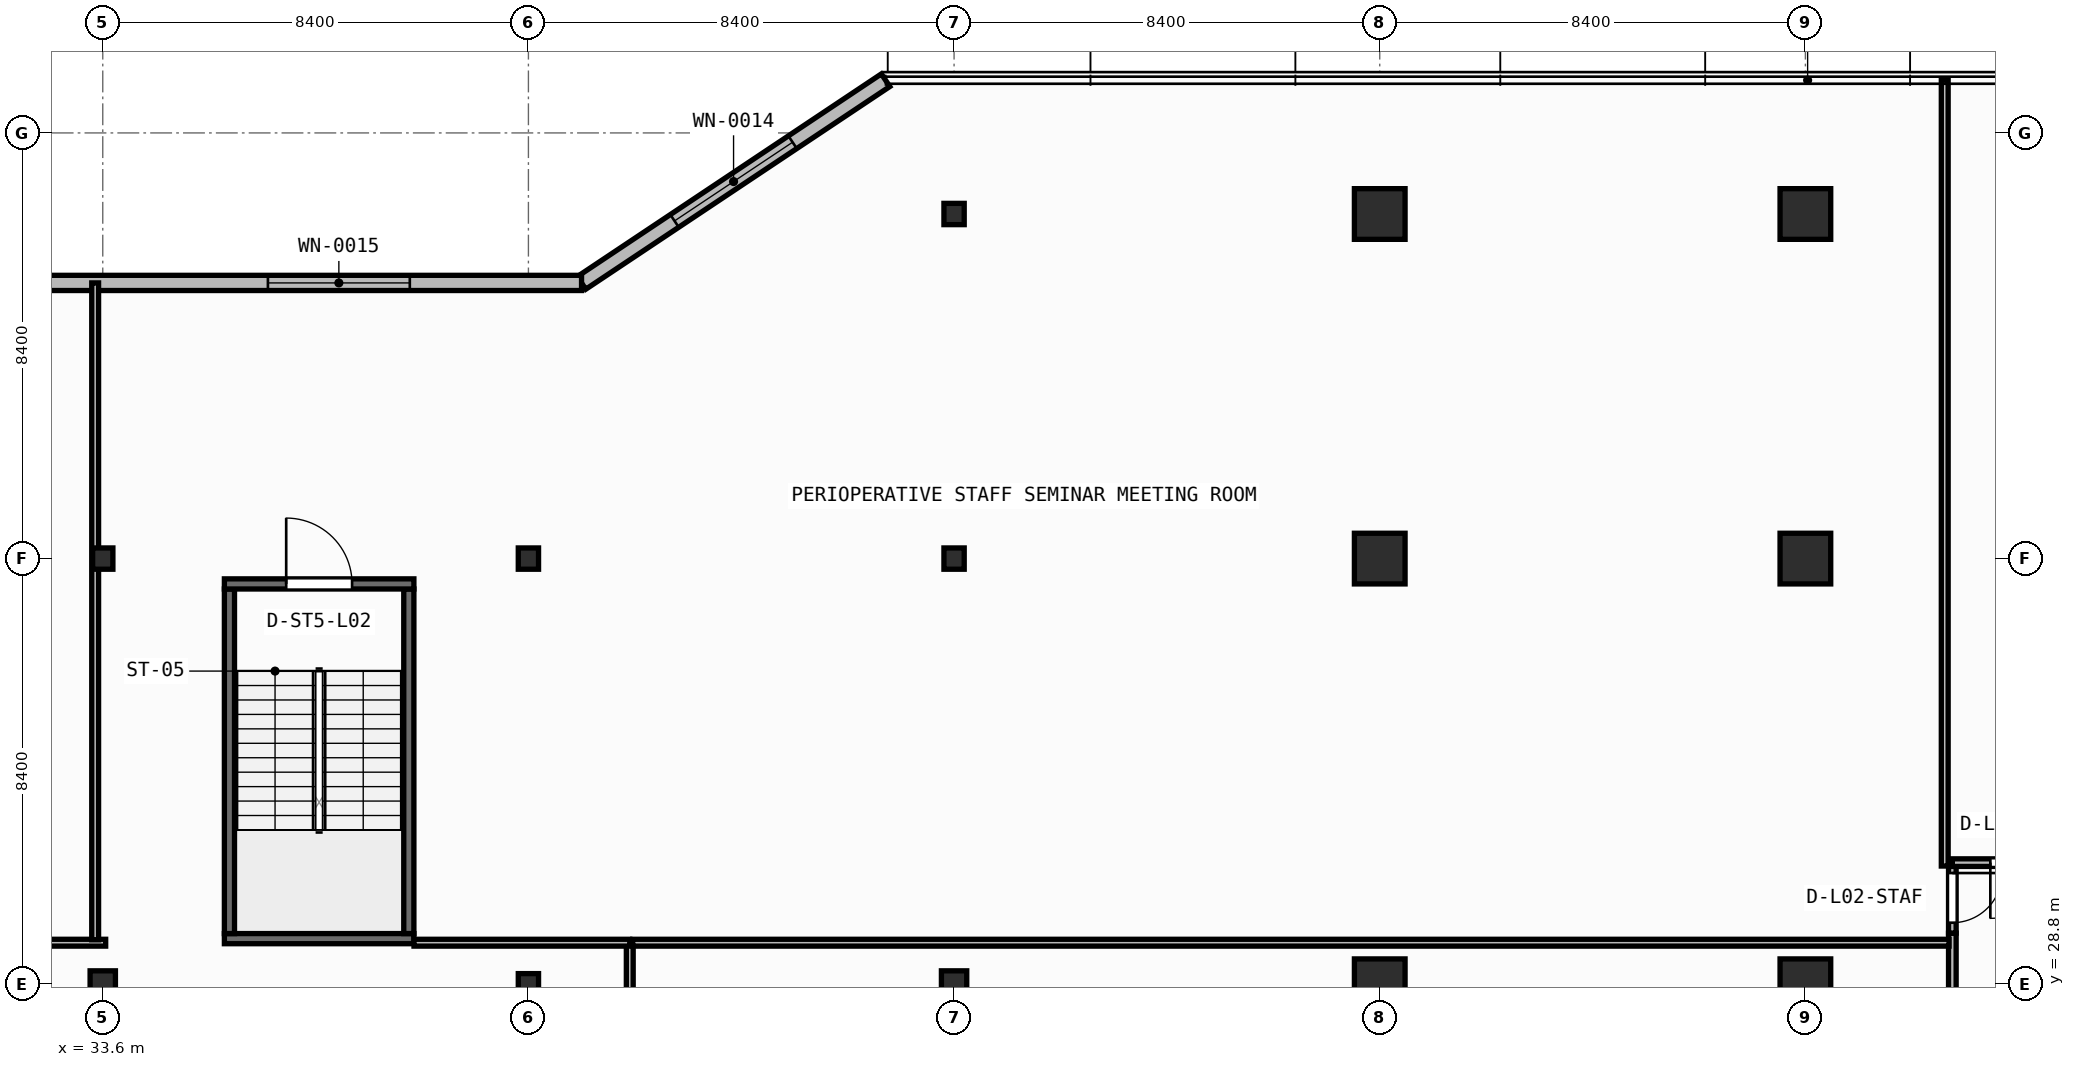
"""IFC4 building model, lengths in metres.
Left out: names, types, materials, properties, quantities, classifications, styles, units other than length and angle.
Written with IfcOpenShell. Run it as: python <this file> out.ifc"""

import sys

from ifc_helpers import new_model, si_unit, direction, frame, frame_2d, origin, origin_2d, place, context, subcontext, project, spatial, rectangle, circle, i_section, extrude, element, fill, save


model = new_model("IFC4")
c1 = context("Model", 3, precision=1e-05, world=origin(), true_north=direction((0.0, 1.0)))
c2 = subcontext(c1, "Body", "Model", "MODEL_VIEW")
j1 = project(units=[si_unit("LENGTHUNIT", "METRE"), si_unit("PLANEANGLEUNIT", "RADIAN")], contexts=[c1])
p1 = place(None, origin())
s1 = spatial("IfcSite", under=j1, at=p1, CompositionType="ELEMENT")
p2 = place(p1, origin())
s2 = spatial("IfcBuilding", under=s1, at=p2, CompositionType="ELEMENT")
p3 = place(p2, frame((0.0, 0.0, 9.0)))
s3 = spatial("IfcBuildingStorey", under=s2, at=p3, CompositionType="ELEMENT", Elevation=9.0)
p4 = place(p3, frame((33.6, 28.8, 0.0), z_axis=(0.0, 0.0, 1.0), x_axis=(1.0, 0.0, 0.0)))
e1 = element("IfcColumn", 1, at=p4, inside=s3, PredefinedType="COLUMN", context=c2, shape_type="SweptSolid", body=[
    extrude(i_section(OverallWidth=0.5, OverallDepth=0.53, WebThickness=0.028, FlangeThickness=0.045, at=origin_2d()), origin(), (0.0, 0.0, 1.0), 4.5),
])
p5 = place(p3, frame((42.0, 28.8, 0.0), z_axis=(0.0, 0.0, 1.0), x_axis=(1.0, 0.0, 0.0)))
e2 = element("IfcColumn", 2, at=p5, inside=s3, PredefinedType="COLUMN", context=c2, shape_type="SweptSolid", body=[
    extrude(i_section(OverallWidth=0.4, OverallDepth=0.42, WebThickness=0.025, FlangeThickness=0.04, at=origin_2d()), origin(), (0.0, 0.0, 1.0), 4.5),
])
p6 = place(p3, frame((50.4, 28.8, 0.0), z_axis=(0.0, 0.0, 1.0), x_axis=(1.0, 0.0, 0.0)))
e3 = element("IfcColumn", 3, at=p6, inside=s3, PredefinedType="COLUMN", context=c2, shape_type="SweptSolid", body=[
    extrude(i_section(OverallWidth=0.5, OverallDepth=0.53, WebThickness=0.028, FlangeThickness=0.045, at=origin_2d()), origin(), (0.0, 0.0, 1.0), 4.5),
])
for number, where, z_axis, x_axis in (
    (4, (58.8, 28.8, 0.0), (0.0, 0.0, 1.0), (1.0, 0.0, 0.0)),
    (5, (67.2, 28.8, 0.0), (0.0, 0.0, 1.0), (1.0, 0.0, 0.0)),
):
    element("IfcColumn", number, at=place(p3, frame(where, z_axis=z_axis, x_axis=x_axis)), inside=s3, PredefinedType="COLUMN", context=c2, shape_type="SweptSolid", body=[
        extrude(circle(Radius=0.5, at=origin_2d()), origin(), (0.0, 0.0, 1.0), 4.5),
    ])
for number, where, z_axis, x_axis in (
    (6, (33.6, 37.2, 0.0), (0.0, 0.0, 1.0), (1.0, 0.0, 0.0)),
    (7, (42.0, 37.2, 0.0), (0.0, 0.0, 1.0), (1.0, 0.0, 0.0)),
    (8, (50.4, 37.2, 0.0), (0.0, 0.0, 1.0), (1.0, 0.0, 0.0)),
):
    element("IfcColumn", number, at=place(p3, frame(where, z_axis=z_axis, x_axis=x_axis)), inside=s3, PredefinedType="COLUMN", context=c2, shape_type="SweptSolid", body=[
        extrude(i_section(OverallWidth=0.4, OverallDepth=0.42, WebThickness=0.025, FlangeThickness=0.04, at=origin_2d()), origin(), (0.0, 0.0, 1.0), 4.5),
    ])
for number, where, z_axis, x_axis in (
    (9, (58.8, 37.2, 0.0), (0.0, 0.0, 1.0), (1.0, 0.0, 0.0)),
    (10, (67.2, 37.2, 0.0), (0.0, 0.0, 1.0), (1.0, 0.0, 0.0)),
):
    element("IfcColumn", number, at=place(p3, frame(where, z_axis=z_axis, x_axis=x_axis)), inside=s3, PredefinedType="COLUMN", context=c2, shape_type="SweptSolid", body=[
        extrude(circle(Radius=0.5, at=origin_2d()), origin(), (0.0, 0.0, 1.0), 4.5),
    ])
p7 = place(p3, frame((50.4, 44.0, 0.0), z_axis=(0.0, 0.0, 1.0), x_axis=(1.0, 0.0, 0.0)))
e11 = element("IfcColumn", 11, at=p7, inside=s3, PredefinedType="COLUMN", context=c2, shape_type="SweptSolid", body=[
    extrude(i_section(OverallWidth=0.4, OverallDepth=0.42, WebThickness=0.025, FlangeThickness=0.04, at=origin_2d()), origin(), (0.0, 0.0, 1.0), 4.5),
])
for number, where, z_axis, x_axis in (
    (12, (58.8, 44.0, 0.0), (0.0, 0.0, 1.0), (1.0, 0.0, 0.0)),
    (13, (67.2, 44.0, 0.0), (0.0, 0.0, 1.0), (1.0, 0.0, 0.0)),
):
    element("IfcColumn", number, at=place(p3, frame(where, z_axis=z_axis, x_axis=x_axis)), inside=s3, PredefinedType="COLUMN", context=c2, shape_type="SweptSolid", body=[
        extrude(circle(Radius=0.5, at=origin_2d()), origin(), (0.0, 0.0, 1.0), 4.5),
    ])
p8 = place(p3, frame((49.048, 46.64, 0.0), z_axis=(0.0, 0.0, 1.0), x_axis=(-0.832050294338, -0.554700196225, 0.0)))
e14 = element("IfcWall", 14, at=p8, inside=s3, PredefinedType="STANDARD", context=c2, shape_type="SweptSolid", body=[
    extrude(rectangle(XDim=7.211, YDim=0.3, at=frame_2d((3.605, 0.0))), origin(), (0.0, 0.0, 1.0), 4.25),
])
p9 = place(p8, frame((2.206, 0.0, 0.85)))
e15 = element("IfcOpeningElement", 15, at=p9, cuts=e14, PredefinedType="OPENING", context=c2, shape_type="SweptSolid", body=[
    extrude(rectangle(XDim=2.8, YDim=2.1, at=frame_2d((1.4, 1.05))), frame((0.0, 0.16, 0.0), z_axis=(0.0, -1.0, 0.0), x_axis=(1.0, 0.0, 0.0)), (0.0, 0.0, 1.0), 0.32),
])
p10 = place(p3, frame((43.048, 42.64, 0.0), z_axis=(0.0, 0.0, 1.0), x_axis=(-1.0, 0.0, 0.0)))
e16 = element("IfcWall", 16, at=p10, inside=s3, PredefinedType="STANDARD", context=c2, shape_type="SweptSolid", body=[
    extrude(rectangle(XDim=18.097, YDim=0.3, at=frame_2d((9.048, 0.0))), origin(), (0.0, 0.0, 1.0), 4.25),
])
p11 = place(p10, frame((3.389, 0.0, 0.85)))
e17 = element("IfcOpeningElement", 17, at=p11, cuts=e16, PredefinedType="OPENING", context=c2, shape_type="SweptSolid", body=[
    extrude(rectangle(XDim=2.8, YDim=2.1, at=frame_2d((1.4, 1.05))), frame((0.0, 0.16, 0.0), z_axis=(0.0, -1.0, 0.0), x_axis=(1.0, 0.0, 0.0)), (0.0, 0.0, 1.0), 0.32),
])
p12 = place(p3, frame((36.0, 29.7, 0.0), z_axis=(0.0, 0.0, 1.0), x_axis=(1.0, 0.0, 0.0)))
e18 = element("IfcWall", 18, at=p12, inside=s3, PredefinedType="SHEAR", context=c2, shape_type="SweptSolid", body=[
    extrude(rectangle(XDim=3.74, YDim=0.2, at=frame_2d((1.87, 0.0))), origin(), (0.0, 0.0, 1.0), 4.25),
])
for number, where, z_axis, x_axis in (
    (19, (36.1, 29.8, 0.0), (0.0, 0.0, 1.0), (0.0, 1.0, 0.0)),
    (20, (39.64, 29.8, 0.0), (0.0, 0.0, 1.0), (0.0, 1.0, 0.0)),
):
    element("IfcWall", number, at=place(p3, frame(where, z_axis=z_axis, x_axis=x_axis)), inside=s3, PredefinedType="SHEAR", context=c2, shape_type="SweptSolid", body=[
        extrude(rectangle(XDim=6.8, YDim=0.2, at=frame_2d((3.4, 0.0))), origin(), (0.0, 0.0, 1.0), 4.25),
    ])
p13 = place(p3, frame((36.0, 36.7, 0.0), z_axis=(0.0, 0.0, 1.0), x_axis=(1.0, 0.0, 0.0)))
e21 = element("IfcWall", 21, at=p13, inside=s3, PredefinedType="SHEAR", context=c2, shape_type="SweptSolid", body=[
    extrude(rectangle(XDim=3.74, YDim=0.2, at=frame_2d((1.87, 0.0))), origin(), (0.0, 0.0, 1.0), 4.25),
])
p14 = place(p13, frame((1.22, 0.0, 0.0)))
e22 = element("IfcOpeningElement", 22, at=p14, cuts=e21, PredefinedType="OPENING", context=c2, shape_type="SweptSolid", body=[
    extrude(rectangle(XDim=1.3, YDim=2.15, at=frame_2d((0.65, 1.075))), frame((0.0, 0.11, 0.0), z_axis=(0.0, -1.0, 0.0), x_axis=(1.0, 0.0, 0.0)), (0.0, 0.0, 1.0), 0.22),
])
p15 = place(p3, frame((70.1, 29.807, 0.0), z_axis=(0.0, 0.0, 1.0), x_axis=(0.0, -1.0, 0.0)))
e23 = element("IfcWall", 23, at=p15, inside=s3, PredefinedType="PARTITIONING", context=c2, shape_type="SweptSolid", body=[
    extrude(rectangle(XDim=14.987, YDim=0.15, at=frame_2d((7.494, 0.0))), origin(), (0.0, 0.0, 1.0), 4.25),
])
p16 = place(p3, frame((70.1, 31.2, 0.0), z_axis=(0.0, 0.0, 1.0), x_axis=(0.0, -1.0, 0.0)))
e24 = element("IfcWall", 24, at=p16, inside=s3, PredefinedType="PARTITIONING", context=c2, shape_type="SweptSolid", body=[
    extrude(rectangle(XDim=1.391, YDim=0.15, at=frame_2d((0.695, 0.0))), origin(), (0.0, 0.0, 1.0), 4.25),
])
p17 = place(p16, frame((0.205, 0.0, 0.0)))
e25 = element("IfcOpeningElement", 25, at=p17, cuts=e24, PredefinedType="OPENING", context=c2, shape_type="SweptSolid", body=[
    extrude(rectangle(XDim=0.98, YDim=2.1, at=frame_2d((0.49, 1.05))), frame((0.0, 0.085, 0.0), z_axis=(0.0, -1.0, 0.0), x_axis=(1.0, 0.0, 0.0)), (0.0, 0.0, 1.0), 0.17),
])
p18 = place(p3, frame((72.7, 31.2, 0.0), z_axis=(0.0, 0.0, 1.0), x_axis=(-1.0, 0.0, 0.0)))
e26 = element("IfcWall", 26, at=p18, inside=s3, PredefinedType="PARTITIONING", context=c2, shape_type="SweptSolid", body=[
    extrude(rectangle(XDim=2.6, YDim=0.15, at=frame_2d((1.3, 0.0))), origin(), (0.0, 0.0, 1.0), 4.25),
])
p19 = place(p18, frame((0.75, 0.0, 0.0)))
e27 = element("IfcOpeningElement", 27, at=p19, cuts=e26, PredefinedType="OPENING", context=c2, shape_type="SweptSolid", body=[
    extrude(rectangle(XDim=1.1, YDim=2.1, at=frame_2d((0.55, 1.05))), frame((0.0, 0.085, 0.0), z_axis=(0.0, -1.0, 0.0), x_axis=(1.0, 0.0, 0.0)), (0.0, 0.0, 1.0), 0.17),
])
p20 = place(p3, frame((44.0, 14.865, 0.0), z_axis=(0.0, 0.0, 1.0), x_axis=(0.0, 1.0, 0.0)))
e28 = element("IfcWall", 28, at=p20, inside=s3, PredefinedType="PARTITIONING", context=c2, shape_type="SweptSolid", body=[
    extrude(rectangle(XDim=14.755, YDim=0.135, at=frame_2d((7.377, 0.0))), origin(), (0.0, 0.0, 1.0), 4.25),
])
p21 = place(p3, frame((33.657, 29.62, 0.0), z_axis=(0.0, 0.0, 1.0), x_axis=(-1.0, 0.0, 0.0)))
e29 = element("IfcWall", 29, at=p21, inside=s3, PredefinedType="PARTITIONING", context=c2, shape_type="SweptSolid", body=[
    extrude(rectangle(XDim=12.6, YDim=0.135, at=frame_2d((6.3, 0.0))), origin(), (0.0, 0.0, 1.0), 4.25),
])
p22 = place(p3, frame((44.0, 29.62, 0.0), z_axis=(0.0, 0.0, 1.0), x_axis=(-1.0, 0.0, 0.0)))
e30 = element("IfcWall", 30, at=p22, inside=s3, PredefinedType="PARTITIONING", context=c2, shape_type="SweptSolid", body=[
    extrude(rectangle(XDim=4.258, YDim=0.135, at=frame_2d((2.129, 0.0))), origin(), (0.0, 0.0, 1.0), 4.25),
])
p23 = place(p3, frame((70.035, 29.62, 0.0), z_axis=(0.0, 0.0, 1.0), x_axis=(-1.0, 0.0, 0.0)))
e31 = element("IfcWall", 31, at=p23, inside=s3, PredefinedType="PARTITIONING", context=c2, shape_type="SweptSolid", body=[
    extrude(rectangle(XDim=25.977, YDim=0.135, at=frame_2d((12.989, 0.0))), origin(), (0.0, 0.0, 1.0), 4.25),
])
p24 = place(p3, frame((33.45, 29.677, 0.0), z_axis=(0.0, 0.0, 1.0), x_axis=(0.0, 1.0, 0.0)))
e32 = element("IfcWall", 32, at=p24, inside=s3, PredefinedType="PARTITIONING", context=c2, shape_type="SweptSolid", body=[
    extrude(rectangle(XDim=12.962, YDim=0.135, at=frame_2d((6.481, 0.0))), origin(), (0.0, 0.0, 1.0), 3.623),
])
p25 = place(p3, frame((69.95, 31.133, 0.0), z_axis=(0.0, 0.0, 1.0), x_axis=(0.0, 1.0, 0.0)))
e33 = element("IfcWall", 33, at=p25, inside=s3, PredefinedType="PARTITIONING", context=c2, shape_type="SweptSolid", body=[
    extrude(rectangle(XDim=15.507, YDim=0.135, at=frame_2d((7.753, 0.0))), origin(), (0.0, 0.0, 1.0), 4.25),
])
p26 = place(p9, origin())
e34 = element("IfcWindow", 34, at=p26, inside=s3, PartitioningType="SINGLE_PANEL", PredefinedType="WINDOW", context=c2, shape_type="SweptSolid", body=[
    extrude(rectangle(XDim=2.8, YDim=2.1, at=frame_2d((1.4, 1.05))), frame((0.0, 0.03, 0.0), z_axis=(0.0, -1.0, 0.0), x_axis=(1.0, 0.0, 0.0)), (0.0, 0.0, 1.0), 0.06),
])
fill(e15, e34)
p27 = place(p11, origin())
e35 = element("IfcWindow", 35, at=p27, inside=s3, PartitioningType="SINGLE_PANEL", PredefinedType="WINDOW", context=c2, shape_type="SweptSolid", body=[
    extrude(rectangle(XDim=2.8, YDim=2.1, at=frame_2d((1.4, 1.05))), frame((0.0, 0.03, 0.0), z_axis=(0.0, -1.0, 0.0), x_axis=(1.0, 0.0, 0.0)), (0.0, 0.0, 1.0), 0.06),
])
fill(e17, e35)
p28 = place(p14, origin())
e36 = element("IfcDoor", 36, at=p28, inside=s3, OperationType="SINGLE_SWING_LEFT", PredefinedType="DOOR", context=c2, shape_type="SweptSolid", body=[
    extrude(rectangle(XDim=1.3, YDim=2.15, at=frame_2d((0.65, 1.075))), frame((0.0, 0.025, 0.0), z_axis=(0.0, -1.0, 0.0), x_axis=(1.0, 0.0, 0.0)), (0.0, 0.0, 1.0), 0.05),
])
fill(e22, e36)
p29 = place(p17, origin())
e37 = element("IfcDoor", 37, at=p29, inside=s3, OperationType="SINGLE_SWING_LEFT", PredefinedType="DOOR", context=c2, shape_type="SweptSolid", body=[
    extrude(rectangle(XDim=0.98, YDim=2.1, at=frame_2d((0.49, 1.05))), frame((0.0, 0.025, 0.0), z_axis=(0.0, -1.0, 0.0), x_axis=(1.0, 0.0, 0.0)), (0.0, 0.0, 1.0), 0.05),
])
fill(e25, e37)
p30 = place(p19, origin())
e38 = element("IfcDoor", 38, at=p30, inside=s3, OperationType="SINGLE_SWING_RIGHT", PredefinedType="DOOR", context=c2, shape_type="SweptSolid", body=[
    extrude(rectangle(XDim=1.1, YDim=2.1, at=frame_2d((0.55, 1.05))), frame((0.0, 0.025, 0.0), z_axis=(0.0, -1.0, 0.0), x_axis=(1.0, 0.0, 0.0)), (0.0, 0.0, 1.0), 0.05),
])
fill(e27, e38)
save(model, sys.argv[1])
